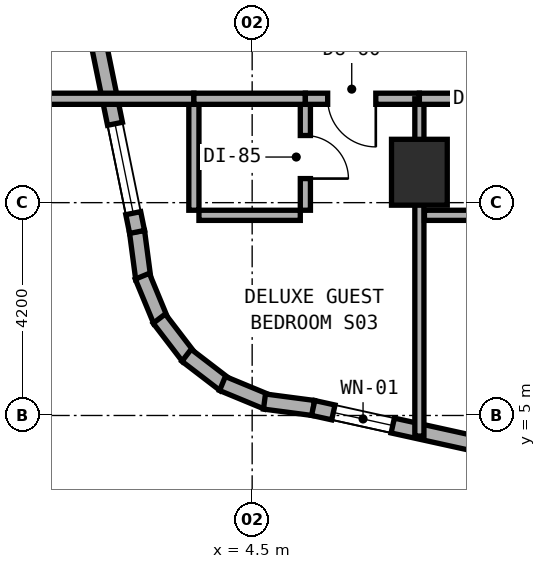
"""IFC4 building model, lengths in metres.
Left out: names, types, materials, properties, quantities, classifications, styles, units other than length and angle.
Written with IfcOpenShell. Run it as: python <this file> out.ifc"""

import sys

from ifc_helpers import new_model, si_unit, direction, frame, frame_2d, origin, origin_2d, place, context, subcontext, project, spatial, rectangle, extrude, element, fill, save


model = new_model("IFC4")
c1 = context("Model", 3, precision=1e-05, world=origin(), true_north=direction((0.0, 1.0)))
c2 = subcontext(c1, "Body", "Model", "MODEL_VIEW")
j1 = project(units=[si_unit("LENGTHUNIT", "METRE"), si_unit("PLANEANGLEUNIT", "RADIAN")], contexts=[c1])
p1 = place(None, origin())
s1 = spatial("IfcSite", under=j1, at=p1, CompositionType="ELEMENT")
p2 = place(p1, origin())
s2 = spatial("IfcBuilding", under=s1, at=p2, CompositionType="ELEMENT")
p3 = place(p2, frame((0.0, 0.0, 24.0)))
s3 = spatial("IfcBuildingStorey", under=s2, at=p3, CompositionType="ELEMENT", Elevation=24.0)
p4 = place(p3, frame((7.8, 9.8, 0.0), z_axis=(0.0, 0.0, 1.0), x_axis=(1.0, 0.0, 0.0)))
e1 = element("IfcColumn", 1, at=p4, inside=s3, PredefinedType="COLUMN", context=c2, shape_type="SweptSolid", body=[
    extrude(rectangle(XDim=1.1, YDim=1.3, at=origin_2d()), origin(), (0.0, 0.0, 1.0), 3.5),
])
p5 = place(p3, frame((2.228, 8.628, 0.0), z_axis=(0.0, 0.0, 1.0), x_axis=(0.131174864804, -0.991359246108, 0.0)))
e2 = element("IfcWall", 2, at=p5, inside=s3, PredefinedType="STANDARD", context=c2, shape_type="SweptSolid", body=[
    extrude(rectangle(XDim=0.938, YDim=0.3, at=frame_2d((0.469, 0.0))), origin(), (0.0, 0.0, 1.0), 3.22),
])
p6 = place(p3, frame((2.332, 7.748, 0.0), z_axis=(0.0, 0.0, 1.0), x_axis=(0.382344263057, -0.924019948111, 0.0)))
e3 = element("IfcWall", 3, at=p6, inside=s3, PredefinedType="STANDARD", context=c2, shape_type="SweptSolid", body=[
    extrude(rectangle(XDim=0.955, YDim=0.3, at=frame_2d((0.477, 0.0))), origin(), (0.0, 0.0, 1.0), 3.22),
])
for number, where, z_axis, x_axis in (
    (4, (2.666, 6.911, 0.0), (0.0, 0.0, 1.0), (0.608, -0.794, 0.0)),
    (5, (3.205, 6.188, 0.0), (0.0, 0.0, 1.0), (0.794, -0.608, 0.0)),
):
    element("IfcWall", number, at=place(p3, frame(where, z_axis=z_axis, x_axis=x_axis)), inside=s3, PredefinedType="STANDARD", context=c2, shape_type="SweptSolid", body=[
        extrude(rectangle(XDim=0.955, YDim=0.3, at=frame_2d((0.478, 0.0))), origin(), (0.0, 0.0, 1.0), 3.22),
    ])
p7 = place(p3, frame((3.914, 5.631, 0.0), z_axis=(0.0, 0.0, 1.0), x_axis=(0.923982547689, -0.382434636986, 0.0)))
e6 = element("IfcWall", 6, at=p7, inside=s3, PredefinedType="STANDARD", context=c2, shape_type="SweptSolid", body=[
    extrude(rectangle(XDim=0.954, YDim=0.3, at=frame_2d((0.477, 0.0))), origin(), (0.0, 0.0, 1.0), 3.22),
])
p8 = place(p3, frame((4.743, 5.275, 0.0), z_axis=(0.0, 0.0, 1.0), x_axis=(0.99145856342, -0.130422072598, 0.0)))
e7 = element("IfcWall", 7, at=p8, inside=s3, PredefinedType="STANDARD", context=c2, shape_type="SweptSolid", body=[
    extrude(rectangle(XDim=0.973, YDim=0.3, at=frame_2d((0.487, 0.0))), origin(), (0.0, 0.0, 1.0), 3.22),
])
p9 = place(p3, frame((5.704, 5.148, 0.0), z_axis=(0.0, 0.0, 1.0), x_axis=(0.9765437942, -0.215318875183, 0.0)))
e8 = element("IfcWall", 8, at=p9, inside=s3, PredefinedType="STANDARD", context=c2, shape_type="SweptSolid", body=[
    extrude(rectangle(XDim=9.353, YDim=0.3, at=frame_2d((4.677, 0.0))), origin(), (0.0, 0.0, 1.0), 3.22),
])
p10 = place(p9, frame((0.408, 0.0, 0.85)))
e9 = element("IfcOpeningElement", 9, at=p10, cuts=e8, PredefinedType="OPENING", context=c2, shape_type="SweptSolid", body=[
    extrude(rectangle(XDim=1.2, YDim=1.5, at=frame_2d((0.6, 0.75))), frame((0.0, 0.16, 0.0), z_axis=(0.0, -1.0, 0.0), x_axis=(1.0, 0.0, 0.0)), (0.0, 0.0, 1.0), 0.32),
])
p11 = place(p9, frame((4.59, 0.0, 0.8)))
e10 = element("IfcOpeningElement", 10, at=p11, cuts=e8, PredefinedType="OPENING", context=c2, shape_type="SweptSolid", body=[
    extrude(rectangle(XDim=2.4, YDim=1.6, at=frame_2d((1.2, 0.8))), frame((0.0, 0.16, 0.0), z_axis=(0.0, -1.0, 0.0), x_axis=(1.0, 0.0, 0.0)), (0.0, 0.0, 1.0), 0.32),
])
p12 = place(p3, frame((0.216, 18.484, 0.0), z_axis=(0.0, 0.0, 1.0), x_axis=(0.199990901713, -0.979797754249, 0.0)))
e11 = element("IfcWall", 11, at=p12, inside=s3, PredefinedType="STANDARD", context=c2, shape_type="SweptSolid", body=[
    extrude(rectangle(XDim=10.065, YDim=0.3, at=frame_2d((5.033, 0.0))), origin(), (0.0, 0.0, 1.0), 3.22),
])
p13 = place(p12, frame((2.429, 0.0, 0.8)))
e12 = element("IfcOpeningElement", 12, at=p13, cuts=e11, PredefinedType="OPENING", context=c2, shape_type="SweptSolid", body=[
    extrude(rectangle(XDim=2.4, YDim=1.6, at=frame_2d((1.2, 0.8))), frame((0.0, 0.16, 0.0), z_axis=(0.0, -1.0, 0.0), x_axis=(1.0, 0.0, 0.0)), (0.0, 0.0, 1.0), 0.32),
])
p14 = place(p12, frame((7.887, 0.0, 0.85)))
e13 = element("IfcOpeningElement", 13, at=p14, cuts=e11, PredefinedType="OPENING", context=c2, shape_type="SweptSolid", body=[
    extrude(rectangle(XDim=1.8, YDim=1.5, at=frame_2d((0.9, 0.75))), frame((0.0, 0.16, 0.0), z_axis=(0.0, -1.0, 0.0), x_axis=(1.0, 0.0, 0.0)), (0.0, 0.0, 1.0), 0.32),
])
p15 = place(p3, frame((5.55, 9.05, 0.0), z_axis=(0.0, 0.0, 1.0), x_axis=(0.0, 1.0, 0.0)))
e14 = element("IfcWall", 14, at=p15, inside=s3, PredefinedType="PLUMBINGWALL", context=c2, shape_type="SweptSolid", body=[
    extrude(rectangle(XDim=2.1, YDim=0.2, at=frame_2d((1.05, 0.0))), origin(), (0.0, 0.0, 1.0), 3.22),
])
p16 = place(p15, frame((0.625, 0.0, 0.0)))
e15 = element("IfcOpeningElement", 15, at=p16, cuts=e14, PredefinedType="OPENING", context=c2, shape_type="SweptSolid", body=[
    extrude(rectangle(XDim=0.85, YDim=2.1, at=frame_2d((0.425, 1.05))), frame((0.0, 0.11, 0.0), z_axis=(0.0, -1.0, 0.0), x_axis=(1.0, 0.0, 0.0)), (0.0, 0.0, 1.0), 0.22),
])
p17 = place(p3, frame((3.45, 8.95, 0.0), z_axis=(0.0, 0.0, 1.0), x_axis=(1.0, 0.0, 0.0)))
e16 = element("IfcWall", 16, at=p17, inside=s3, PredefinedType="PLUMBINGWALL", context=c2, shape_type="SweptSolid", body=[
    extrude(rectangle(XDim=2.0, YDim=0.2, at=frame_2d((1.0, 0.0))), origin(), (0.0, 0.0, 1.0), 3.22),
])
p18 = place(p3, frame((3.35, 9.05, 0.0), z_axis=(0.0, 0.0, 1.0), x_axis=(0.0, 1.0, 0.0)))
e17 = element("IfcWall", 17, at=p18, inside=s3, PredefinedType="PLUMBINGWALL", context=c2, shape_type="SweptSolid", body=[
    extrude(rectangle(XDim=2.1, YDim=0.2, at=frame_2d((1.05, 0.0))), origin(), (0.0, 0.0, 1.0), 3.22),
])
p19 = place(p3, frame((0.24, 11.25, 0.0), z_axis=(0.0, 0.0, 1.0), x_axis=(1.0, 0.0, 0.0)))
e18 = element("IfcWall", 18, at=p19, inside=s3, PredefinedType="SOLIDWALL", context=c2, shape_type="SweptSolid", body=[
    extrude(rectangle(XDim=3.11, YDim=0.22, at=frame_2d((1.555, 0.0))), origin(), (0.0, 0.0, 1.0), 3.22),
])
p20 = place(p3, frame((3.35, 11.25, 0.0), z_axis=(0.0, 0.0, 1.0), x_axis=(1.0, 0.0, 0.0)))
e19 = element("IfcWall", 19, at=p20, inside=s3, PredefinedType="SOLIDWALL", context=c2, shape_type="SweptSolid", body=[
    extrude(rectangle(XDim=2.2, YDim=0.22, at=frame_2d((1.1, 0.0))), origin(), (0.0, 0.0, 1.0), 3.22),
])
p21 = place(p3, frame((5.55, 11.25, 0.0), z_axis=(0.0, 0.0, 1.0), x_axis=(1.0, 0.0, 0.0)))
e20 = element("IfcWall", 20, at=p21, inside=s3, PredefinedType="SOLIDWALL", context=c2, shape_type="SweptSolid", body=[
    extrude(rectangle(XDim=2.25, YDim=0.22, at=frame_2d((1.125, 0.0))), origin(), (0.0, 0.0, 1.0), 2.295),
])
p22 = place(p21, frame((0.44, 0.0, 0.0)))
e21 = element("IfcOpeningElement", 21, at=p22, cuts=e20, PredefinedType="OPENING", context=c2, shape_type="SweptSolid", body=[
    extrude(rectangle(XDim=0.95, YDim=2.1, at=frame_2d((0.475, 1.05))), frame((0.0, 0.12, 0.0), z_axis=(0.0, -1.0, 0.0), x_axis=(1.0, 0.0, 0.0)), (0.0, 0.0, 1.0), 0.24),
])
p23 = place(p3, frame((7.8, 4.594, 0.0), z_axis=(0.0, 0.0, 1.0), x_axis=(0.0, 1.0, 0.0)))
e22 = element("IfcWall", 22, at=p23, inside=s3, PredefinedType="SOLIDWALL", context=c2, shape_type="SweptSolid", body=[
    extrude(rectangle(XDim=6.656, YDim=0.18, at=frame_2d((3.328, 0.0))), origin(), (0.0, 0.0, 1.0), 2.295),
])
p24 = place(p3, frame((7.9, 8.95, 0.0), z_axis=(0.0, 0.0, 1.0), x_axis=(1.0, 0.0, 0.0)))
e23 = element("IfcWall", 23, at=p24, inside=s3, PredefinedType="PLUMBINGWALL", context=c2, shape_type="SweptSolid", body=[
    extrude(rectangle(XDim=2.0, YDim=0.2, at=frame_2d((1.0, 0.0))), origin(), (0.0, 0.0, 1.0), 3.22),
])
p25 = place(p3, frame((7.8, 11.25, 0.0), z_axis=(0.0, 0.0, 1.0), x_axis=(1.0, 0.0, 0.0)))
e24 = element("IfcWall", 24, at=p25, inside=s3, PredefinedType="SOLIDWALL", context=c2, shape_type="SweptSolid", body=[
    extrude(rectangle(XDim=2.2, YDim=0.22, at=frame_2d((1.1, 0.0))), origin(), (0.0, 0.0, 1.0), 2.295),
])
p26 = place(p10, origin())
e25 = element("IfcWindow", 25, at=p26, inside=s3, PartitioningType="SINGLE_PANEL", PredefinedType="WINDOW", context=c2, shape_type="SweptSolid", body=[
    extrude(rectangle(XDim=1.2, YDim=1.5, at=frame_2d((0.6, 0.75))), frame((0.0, 0.03, 0.0), z_axis=(0.0, -1.0, 0.0), x_axis=(1.0, 0.0, 0.0)), (0.0, 0.0, 1.0), 0.06),
])
fill(e9, e25)
p27 = place(p14, origin())
e26 = element("IfcWindow", 26, at=p27, inside=s3, PartitioningType="SINGLE_PANEL", PredefinedType="WINDOW", context=c2, shape_type="SweptSolid", body=[
    extrude(rectangle(XDim=1.8, YDim=1.5, at=frame_2d((0.9, 0.75))), frame((0.0, 0.03, 0.0), z_axis=(0.0, -1.0, 0.0), x_axis=(1.0, 0.0, 0.0)), (0.0, 0.0, 1.0), 0.06),
])
fill(e13, e26)
p28 = place(p16, frame((0.85, 0.0, 0.0), z_axis=(0.0, 0.0, 1.0), x_axis=(-1.0, 0.0, 0.0)))
e27 = element("IfcDoor", 27, at=p28, inside=s3, OperationType="SINGLE_SWING_RIGHT", PredefinedType="DOOR", context=c2, shape_type="SweptSolid", body=[
    extrude(rectangle(XDim=0.85, YDim=2.1, at=frame_2d((0.425, 1.05))), frame((0.0, 0.025, 0.0), z_axis=(0.0, -1.0, 0.0), x_axis=(1.0, 0.0, 0.0)), (0.0, 0.0, 1.0), 0.05),
])
fill(e15, e27)
p29 = place(p22, frame((0.95, 0.0, 0.0), z_axis=(0.0, 0.0, 1.0), x_axis=(-1.0, 0.0, 0.0)))
e28 = element("IfcDoor", 28, at=p29, inside=s3, OperationType="SINGLE_SWING_LEFT", PredefinedType="DOOR", context=c2, shape_type="SweptSolid", body=[
    extrude(rectangle(XDim=0.95, YDim=2.1, at=frame_2d((0.475, 1.05))), frame((0.0, 0.025, 0.0), z_axis=(0.0, -1.0, 0.0), x_axis=(1.0, 0.0, 0.0)), (0.0, 0.0, 1.0), 0.05),
])
fill(e21, e28)
save(model, sys.argv[1])
